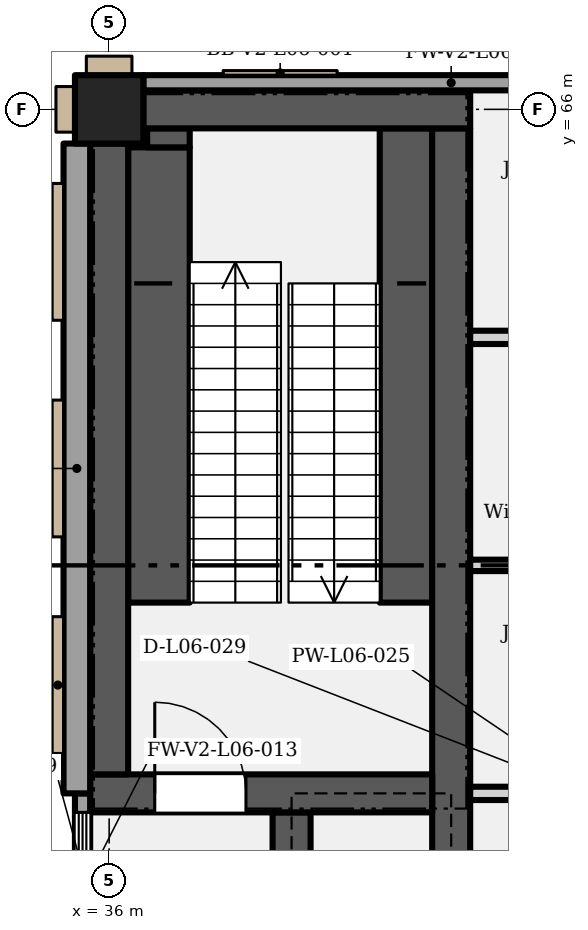
"""IFC4 building model, lengths in metres.
Left out: names, types, materials, properties, quantities, classifications, styles, units other than length and angle.
Written with IfcOpenShell. Run it as: python <this file> out.ifc"""

import sys

from ifc_helpers import new_model, si_unit, direction, frame, frame_2d, origin, origin_2d, place, context, subcontext, project, spatial, rectangle, extrude, element, fill, save


model = new_model("IFC4")
c1 = context("Model", 3, precision=1e-05, world=origin(), true_north=direction((0.0, 1.0)))
c2 = subcontext(c1, "Body", "Model", "MODEL_VIEW")
j1 = project(units=[si_unit("LENGTHUNIT", "METRE"), si_unit("PLANEANGLEUNIT", "RADIAN")], contexts=[c1])
p1 = place(None, origin())
s1 = spatial("IfcSite", under=j1, at=p1, CompositionType="ELEMENT")
p2 = place(p1, origin())
s2 = spatial("IfcBuilding", under=s1, at=p2, CompositionType="ELEMENT")
p3 = place(p2, frame((0.0, 0.0, 33.6)))
s3 = spatial("IfcBuildingStorey", under=s2, at=p3, CompositionType="ELEMENT", Elevation=33.6)
p4 = place(p3, frame((36.0, 66.0, 0.0), z_axis=(0.0, 0.0, 1.0), x_axis=(1.0, 0.0, 0.0)))
e1 = element("IfcColumn", 1, at=p4, inside=s3, PredefinedType="COLUMN", context=c2, shape_type="SweptSolid", body=[
    extrude(rectangle(XDim=0.9, YDim=0.9, at=origin_2d()), origin(), (0.0, 0.0, 1.0), 5.4),
])
p5 = place(p3, frame((38.4, 54.25, 0.0), z_axis=(0.0, 0.0, 1.0), x_axis=(0.0, 1.0, 0.0)))
e2 = element("IfcWall", 2, at=p5, inside=s3, PredefinedType="SHEAR", context=c2, shape_type="SweptSolid", body=[
    extrude(rectangle(XDim=2.5, YDim=0.5, at=frame_2d((1.25, 0.0))), origin(), (0.0, 0.0, 1.0), 5.15),
])
p6 = place(p5, frame((0.7, 0.0, 0.0)))
e3 = element("IfcOpeningElement", 3, at=p6, cuts=e2, PredefinedType="OPENING", context=c2, shape_type="SweptSolid", body=[
    extrude(rectangle(XDim=1.1, YDim=2.1, at=frame_2d((0.55, 1.05))), frame((0.0, 0.26, 0.0), z_axis=(0.0, -1.0, 0.0), x_axis=(1.0, 0.0, 0.0)), (0.0, 0.0, 1.0), 0.52),
])
p7 = place(p3, frame((40.5, 54.25, 0.0), z_axis=(0.0, 0.0, 1.0), x_axis=(0.0, 1.0, 0.0)))
e4 = element("IfcWall", 4, at=p7, inside=s3, PredefinedType="SHEAR", context=c2, shape_type="SweptSolid", body=[
    extrude(rectangle(XDim=11.5, YDim=0.5, at=frame_2d((5.75, 0.0))), origin(), (0.0, 0.0, 1.0), 5.15),
])
p8 = place(p3, frame((35.75, 57.0, 0.0), z_axis=(0.0, 0.0, 1.0), x_axis=(1.0, 0.0, 0.0)))
e5 = element("IfcWall", 5, at=p8, inside=s3, PredefinedType="SHEAR", context=c2, shape_type="SweptSolid", body=[
    extrude(rectangle(XDim=4.5, YDim=0.5, at=frame_2d((2.25, 0.0))), origin(), (0.0, 0.0, 1.0), 5.15),
])
p9 = place(p8, frame((0.85, 0.0, 0.0)))
e6 = element("IfcOpeningElement", 6, at=p9, cuts=e5, PredefinedType="OPENING", context=c2, shape_type="SweptSolid", body=[
    extrude(rectangle(XDim=1.2, YDim=2.1, at=frame_2d((0.6, 1.05))), frame((0.0, 0.26, 0.0), z_axis=(0.0, -1.0, 0.0), x_axis=(1.0, 0.0, 0.0)), (0.0, 0.0, 1.0), 0.52),
])
p10 = place(p3, frame((36.0, 57.25, 0.0), z_axis=(0.0, 0.0, 1.0), x_axis=(0.0, 1.0, 0.0)))
e7 = element("IfcWall", 7, at=p10, inside=s3, PredefinedType="SHEAR", context=c2, shape_type="SweptSolid", body=[
    extrude(rectangle(XDim=8.3, YDim=0.5, at=frame_2d((4.15, 0.0))), origin(), (0.0, 0.0, 1.0), 5.15),
])
p11 = place(p3, frame((36.45, 66.0, 0.0), z_axis=(0.0, 0.0, 1.0), x_axis=(1.0, 0.0, 0.0)))
e8 = element("IfcWall", 8, at=p11, inside=s3, PredefinedType="SHEAR", context=c2, shape_type="SweptSolid", body=[
    extrude(rectangle(XDim=4.3, YDim=0.5, at=frame_2d((2.15, 0.0))), origin(), (0.0, 0.0, 1.0), 5.15),
])
p12 = place(p3, frame((36.45, 66.35, 0.0), z_axis=(0.0, 0.0, 1.0), x_axis=(1.0, 0.0, 0.0)))
e9 = element("IfcWall", 9, at=p12, inside=s3, PredefinedType="SOLIDWALL", context=c2, shape_type="SweptSolid", body=[
    extrude(rectangle(XDim=8.1, YDim=0.2, at=frame_2d((4.05, 0.0))), origin(), (0.0, 0.0, 1.0), 5.15),
])
p13 = place(p12, frame((6.525, 0.0, 1.05)))
e10 = element("IfcOpeningElement", 10, at=p13, cuts=e9, PredefinedType="OPENING", context=c2, shape_type="SweptSolid", body=[
    extrude(rectangle(XDim=1.05, YDim=2.4, at=frame_2d((0.525, 1.2))), frame((0.0, 0.11, 0.0), z_axis=(0.0, -1.0, 0.0), x_axis=(1.0, 0.0, 0.0)), (0.0, 0.0, 1.0), 0.22),
])
p14 = place(p3, frame((35.65, 54.45, 0.0), z_axis=(0.0, 0.0, 1.0), x_axis=(0.0, 1.0, 0.0)))
e11 = element("IfcWall", 11, at=p14, inside=s3, PredefinedType="SOLIDWALL", context=c2, shape_type="SweptSolid", body=[
    extrude(rectangle(XDim=2.55, YDim=0.2, at=frame_2d((1.275, 0.0))), origin(), (0.0, 0.0, 1.0), 5.15),
])
p15 = place(p14, frame((0.8, 0.0, 1.05)))
e12 = element("IfcOpeningElement", 12, at=p15, cuts=e11, PredefinedType="OPENING", context=c2, shape_type="SweptSolid", body=[
    extrude(rectangle(XDim=1.5, YDim=3.5, at=frame_2d((0.75, 1.75))), frame((0.0, 0.11, 0.0), z_axis=(0.0, -1.0, 0.0), x_axis=(1.0, 0.0, 0.0)), (0.0, 0.0, 1.0), 0.22),
])
p16 = place(p3, frame((35.575, 57.0, 0.0), z_axis=(0.0, 0.0, 1.0), x_axis=(0.0, 1.0, 0.0)))
e13 = element("IfcWall", 13, at=p16, inside=s3, PredefinedType="SOLIDWALL", context=c2, shape_type="SweptSolid", body=[
    extrude(rectangle(XDim=8.55, YDim=0.35, at=frame_2d((4.275, 0.0))), origin(), (0.0, 0.0, 1.0), 5.15),
])
p17 = place(p3, frame((40.75, 57.0, 0.0), z_axis=(0.0, 0.0, 1.0), x_axis=(1.0, 0.0, 0.0)))
e14 = element("IfcWall", 14, at=p17, inside=s3, PredefinedType="PARTITIONING", context=c2, shape_type="SweptSolid", body=[
    extrude(rectangle(XDim=3.275, YDim=0.175, at=frame_2d((1.637, 0.0))), origin(), (0.0, 0.0, 1.0), 5.15),
])
p18 = place(p17, frame((2.0, 0.0, 0.0), z_axis=(0.0, 0.0, 1.0), x_axis=(-1.0, 0.0, 0.0)))
e15 = element("IfcOpeningElement", 15, at=p18, cuts=e14, PredefinedType="OPENING", context=c2, shape_type="SweptSolid", body=[
    extrude(rectangle(XDim=0.9, YDim=2.1, at=frame_2d((0.45, 1.05))), frame((0.0, 0.097, 0.0), z_axis=(0.0, -1.0, 0.0), x_axis=(1.0, 0.0, 0.0)), (0.0, 0.0, 1.0), 0.195),
])
p19 = place(p3, frame((40.75, 60.0, 0.0), z_axis=(0.0, 0.0, 1.0), x_axis=(1.0, 0.0, 0.0)))
e16 = element("IfcWall", 16, at=p19, inside=s3, PredefinedType="PARTITIONING", context=c2, shape_type="SweptSolid", body=[
    extrude(rectangle(XDim=3.275, YDim=0.15, at=frame_2d((1.637, 0.0))), origin(), (0.0, 0.0, 1.0), 5.15),
])
p20 = place(p3, frame((40.75, 63.0, 0.0), z_axis=(0.0, 0.0, 1.0), x_axis=(1.0, 0.0, 0.0)))
e17 = element("IfcWall", 17, at=p20, inside=s3, PredefinedType="PARTITIONING", context=c2, shape_type="SweptSolid", body=[
    extrude(rectangle(XDim=3.35, YDim=0.175, at=frame_2d((1.675, 0.0))), origin(), (0.0, 0.0, 1.0), 5.15),
])
p21 = place(p3, frame((36.655, 59.51, 0.0), z_axis=(0.0, 0.0, 1.0), x_axis=(0.0, 1.0, 0.0)))
e18 = element("IfcWall", 18, at=p21, inside=s3, PredefinedType="SHEAR", context=c2, shape_type="SweptSolid", body=[
    extrude(rectangle(XDim=5.99, YDim=0.81, at=frame_2d((2.995, 0.0))), origin(), (0.0, 0.0, 1.0), 2.587),
])
p22 = place(p3, frame((36.78, 65.5, 0.0), z_axis=(0.0, 0.0, 1.0), x_axis=(0.0, 1.0, 0.0)))
e19 = element("IfcWall", 19, at=p22, inside=s3, PredefinedType="SHEAR", context=c2, shape_type="SweptSolid", body=[
    extrude(rectangle(XDim=0.25, YDim=0.56, at=frame_2d((0.125, 0.0))), origin(), (0.0, 0.0, 1.0), 2.587),
])
p23 = place(p3, frame((39.905, 59.51, 0.0), z_axis=(0.0, 0.0, 1.0), x_axis=(0.0, 1.0, 0.0)))
e20 = element("IfcWall", 20, at=p23, inside=s3, PredefinedType="SHEAR", context=c2, shape_type="SweptSolid", body=[
    extrude(rectangle(XDim=6.24, YDim=0.69, at=frame_2d((3.12, 0.0))), origin(), (0.0, 0.0, 1.0), 2.587),
])
p24 = place(p15, origin())
e21 = element("IfcWindow", 21, at=p24, inside=s3, PartitioningType="SINGLE_PANEL", PredefinedType="WINDOW", context=c2, shape_type="SweptSolid", body=[
    extrude(rectangle(XDim=1.5, YDim=3.5, at=frame_2d((0.75, 1.75))), frame((0.0, 0.03, 0.0), z_axis=(0.0, -1.0, 0.0), x_axis=(1.0, 0.0, 0.0)), (0.0, 0.0, 1.0), 0.06),
])
fill(e12, e21)
p25 = place(p9, origin())
e22 = element("IfcDoor", 22, at=p25, inside=s3, OperationType="SINGLE_SWING_LEFT", PredefinedType="DOOR", context=c2, shape_type="SweptSolid", body=[
    extrude(rectangle(XDim=1.2, YDim=2.1, at=frame_2d((0.6, 1.05))), frame((0.0, 0.025, 0.0), z_axis=(0.0, -1.0, 0.0), x_axis=(1.0, 0.0, 0.0)), (0.0, 0.0, 1.0), 0.05),
])
fill(e6, e22)
save(model, sys.argv[1])
